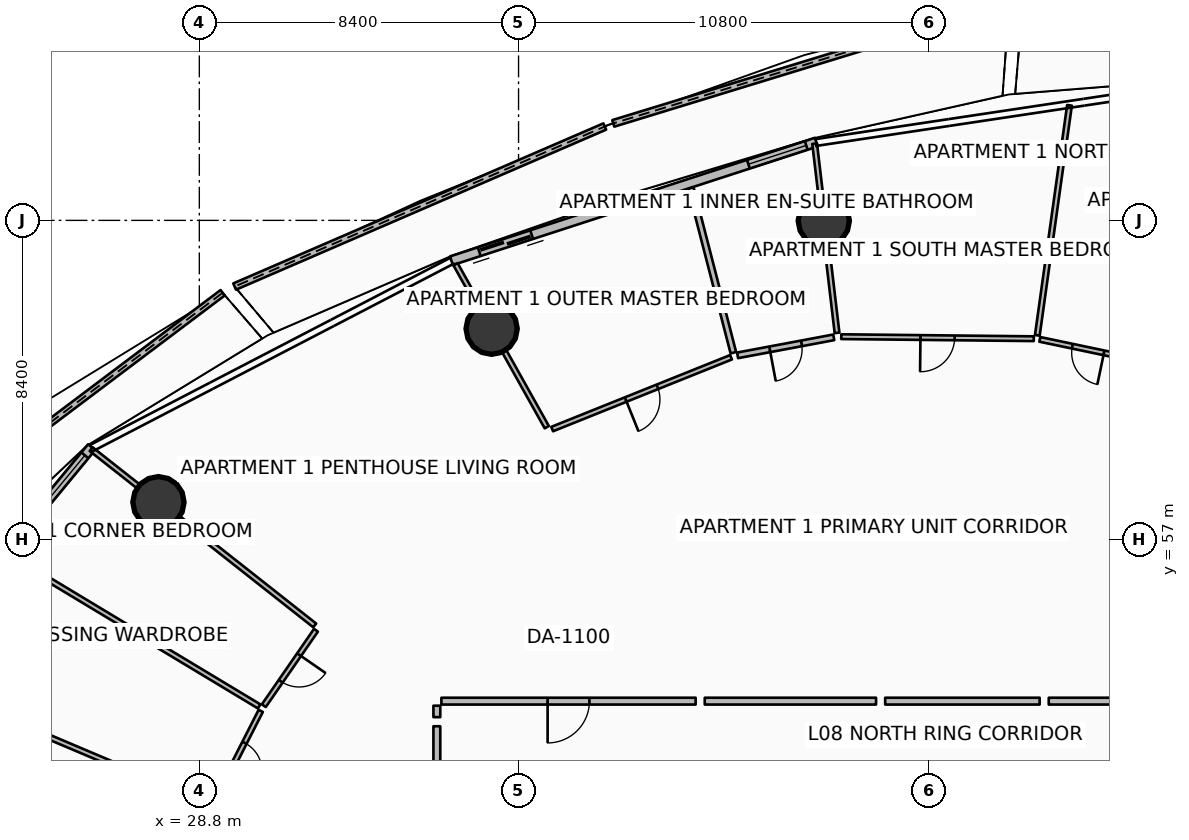
"""IFC4 building model, lengths in metres.
Left out: names, types, materials, properties, quantities, classifications, styles, units other than length and angle.
Written with IfcOpenShell. Run it as: python <this file> out.ifc"""

import sys

from ifc_helpers import new_model, si_unit, direction, frame, frame_2d, origin, origin_2d, place, context, subcontext, project, spatial, polyline, rectangle, circle, outline, extrude, element, fill, save


model = new_model("IFC4")
c1 = context("Model", 3, precision=1e-05, world=origin(), true_north=direction((0.0, 1.0)))
c2 = subcontext(c1, "Body", "Model", "MODEL_VIEW")
j1 = project(units=[si_unit("LENGTHUNIT", "METRE"), si_unit("PLANEANGLEUNIT", "RADIAN")], contexts=[c1])
p1 = place(None, origin())
s1 = spatial("IfcSite", under=j1, at=p1, CompositionType="ELEMENT")
p2 = place(p1, origin())
s2 = spatial("IfcBuilding", under=s1, at=p2, CompositionType="ELEMENT")
p3 = place(p2, frame((0.0, 0.0, 37.65)))
s3 = spatial("IfcBuildingStorey", under=s2, at=p3, CompositionType="ELEMENT", Elevation=37.65)
for number, where, z_axis, x_axis in (
    (1, (45.232, 65.389, 0.0), (0.0, 0.0, 1.0), (1.0, 0.0, 0.0)),
    (2, (36.492, 62.55, 0.0), (0.0, 0.0, 1.0), (1.0, 0.0, 0.0)),
    (3, (27.724, 57.984, 0.0), (0.0, 0.0, 1.0), (1.0, 0.0, 0.0)),
):
    element("IfcColumn", number, at=place(p3, frame(where, z_axis=z_axis, x_axis=x_axis)), inside=s3, PredefinedType="COLUMN", context=c2, shape_type="SweptSolid", body=[
        extrude(circle(Radius=0.675, at=origin_2d()), origin(), (0.0, 0.0, 1.0), 3.5),
    ])
p4 = place(p3, frame((50.114, 71.14, 0.0), z_axis=(0.0, 0.0, 1.0), x_axis=(-0.956262130287, -0.292511090695, 0.0)))
e4 = element("IfcWall", 4, at=p4, inside=s3, PredefinedType="PARAPET", context=c2, shape_type="SweptSolid", body=[
    extrude(outline(polyline([(0.0, 0.0), (10.897, 0.0), (10.897, 1.348), (5.448, 1.562), (0.0, 1.747), (0.0, 0.0)])), frame((0.0, 0.09, 0.0), z_axis=(0.0, -1.0, 0.0), x_axis=(1.0, 0.0, 0.0)), (0.0, 0.0, 1.0), 0.18),
])
p5 = place(p3, frame((39.469, 67.87, 0.0), z_axis=(0.0, 0.0, 1.0), x_axis=(-0.91788240727, -0.396852474384, 0.0)))
e5 = element("IfcWall", 5, at=p5, inside=s3, PredefinedType="PARAPET", context=c2, shape_type="SweptSolid", body=[
    extrude(outline(polyline([(0.0, 0.0), (10.611, 0.0), (10.611, 1.12), (5.305, 1.182), (0.0, 1.348), (0.0, 0.0)])), frame((0.0, 0.09, 0.0), z_axis=(0.0, -1.0, 0.0), x_axis=(1.0, 0.0, 0.0)), (0.0, 0.0, 1.0), 0.18),
])
p6 = place(p3, frame((29.413, 63.495, 0.0), z_axis=(0.0, 0.0, 1.0), x_axis=(-0.798916487869, -0.601441971773, 0.0)))
e6 = element("IfcWall", 6, at=p6, inside=s3, PredefinedType="PARAPET", context=c2, shape_type="SweptSolid", body=[
    extrude(outline(polyline([(0.0, 0.0), (11.803, 0.0), (11.803, 1.348), (5.902, 1.182), (0.0, 1.12), (0.0, 0.0)])), frame((0.0, 0.09, 0.0), z_axis=(0.0, -1.0, 0.0), x_axis=(1.0, 0.0, 0.0)), (0.0, 0.0, 1.0), 0.18),
])
p7 = place(p3, frame((45.036, 67.458, 0.0), z_axis=(0.0, 0.0, 1.0), x_axis=(-0.951054679225, -0.309022648238, 0.0)))
e7 = element("IfcWall", 7, at=p7, inside=s3, PredefinedType="SOLIDWALL", context=c2, shape_type="SweptSolid", body=[
    extrude(rectangle(XDim=10.097, YDim=0.24, at=frame_2d((5.048, 0.0))), origin(), (0.0, 0.0, 1.0), 2.45),
])
p8 = place(p7, frame((7.877, 0.0, 0.0)))
e8 = element("IfcOpeningElement", 8, at=p8, cuts=e7, PredefinedType="OPENING", context=c2, shape_type="SweptSolid", body=[
    extrude(rectangle(XDim=1.45, YDim=2.15, at=frame_2d((0.725, 1.075))), frame((0.0, 0.13, 0.0), z_axis=(0.0, -1.0, 0.0), x_axis=(1.0, 0.0, 0.0)), (0.0, 0.0, 1.0), 0.26),
])
p9 = place(p7, frame((0.28, 0.0, 0.65)))
e9 = element("IfcOpeningElement", 9, at=p9, cuts=e7, PredefinedType="OPENING", context=c2, shape_type="SweptSolid", body=[
    extrude(rectangle(XDim=1.6, YDim=1.5, at=frame_2d((0.8, 0.75))), frame((0.0, 0.13, 0.0), z_axis=(0.0, -1.0, 0.0), x_axis=(1.0, 0.0, 0.0)), (0.0, 0.0, 1.0), 0.26),
])
p10 = place(p3, frame((25.967, 59.433, 0.0), z_axis=(0.0, 0.0, 1.0), x_axis=(-0.636674332663, -0.771132799281, 0.0)))
e10 = element("IfcWall", 10, at=p10, inside=s3, PredefinedType="SOLIDWALL", context=c2, shape_type="SweptSolid", body=[
    extrude(rectangle(XDim=11.851, YDim=0.24, at=frame_2d((5.926, 0.0))), origin(), (0.0, 0.0, 1.0), 2.45),
])
p11 = place(p10, frame((9.631, 0.0, 0.0)))
e11 = element("IfcOpeningElement", 11, at=p11, cuts=e10, PredefinedType="OPENING", context=c2, shape_type="SweptSolid", body=[
    extrude(rectangle(XDim=1.45, YDim=2.15, at=frame_2d((0.725, 1.075))), frame((0.0, 0.13, 0.0), z_axis=(0.0, -1.0, 0.0), x_axis=(1.0, 0.0, 0.0)), (0.0, 0.0, 1.0), 0.26),
])
p12 = place(p10, frame((0.28, 0.0, 0.65)))
e12 = element("IfcOpeningElement", 12, at=p12, cuts=e10, PredefinedType="OPENING", context=c2, shape_type="SweptSolid", body=[
    extrude(rectangle(XDim=1.6, YDim=1.5, at=frame_2d((0.8, 0.75))), frame((0.0, 0.13, 0.0), z_axis=(0.0, -1.0, 0.0), x_axis=(1.0, 0.0, 0.0)), (0.0, 0.0, 1.0), 0.26),
])
p13 = place(p3, frame((41.86, 52.75, 0.0), z_axis=(0.0, 0.0, 1.0), x_axis=(-1.0, 0.0, 0.0)))
e13 = element("IfcWall", 13, at=p13, inside=s3, PredefinedType="PARTITIONING", context=c2, shape_type="SweptSolid", body=[
    extrude(rectangle(XDim=6.69, YDim=0.18, at=frame_2d((3.345, 0.0))), origin(), (0.0, 0.0, 1.0), 2.867),
])
p14 = place(p13, frame((2.795, 0.0, 0.0)))
e14 = element("IfcOpeningElement", 14, at=p14, cuts=e13, PredefinedType="OPENING", context=c2, shape_type="SweptSolid", body=[
    extrude(rectangle(XDim=1.1, YDim=2.1, at=frame_2d((0.55, 1.05))), frame((0.0, 0.1, 0.0), z_axis=(0.0, -1.0, 0.0), x_axis=(1.0, 0.0, 0.0)), (0.0, 0.0, 1.0), 0.2),
])
p15 = place(p3, frame((35.05, 52.63, 0.0), z_axis=(0.0, 0.0, 1.0), x_axis=(0.0, -1.0, 0.0)))
e15 = element("IfcWall", 15, at=p15, inside=s3, PredefinedType="PARTITIONING", context=c2, shape_type="SweptSolid", body=[
    extrude(rectangle(XDim=0.301, YDim=0.18, at=frame_2d((0.15, 0.0))), origin(), (0.0, 0.0, 1.0), 2.867),
])
p16 = place(p3, frame((56.354, 52.75, 0.0), z_axis=(0.0, 0.0, 1.0), x_axis=(-1.0, 0.0, 0.0)))
e16 = element("IfcWall", 16, at=p16, inside=s3, PredefinedType="PARTITIONING", context=c2, shape_type="SweptSolid", body=[
    extrude(rectangle(XDim=5.203, YDim=0.18, at=frame_2d((2.601, 0.0))), origin(), (0.0, 0.0, 1.0), 2.867),
])
p17 = place(p3, frame((50.912, 52.75, 0.0), z_axis=(0.0, 0.0, 1.0), x_axis=(-1.0, 0.0, 0.0)))
e17 = element("IfcWall", 17, at=p17, inside=s3, PredefinedType="PARTITIONING", context=c2, shape_type="SweptSolid", body=[
    extrude(rectangle(XDim=4.064, YDim=0.18, at=frame_2d((2.032, 0.0))), origin(), (0.0, 0.0, 1.0), 2.867),
])
p18 = place(p3, frame((50.851, 62.375, 0.0), z_axis=(0.0, 0.0, 1.0), x_axis=(0.138574188501, 0.990352055726, 0.0)))
e18 = element("IfcWall", 18, at=p18, inside=s3, PredefinedType="PARTITIONING", context=c2, shape_type="SweptSolid", body=[
    extrude(rectangle(XDim=6.112, YDim=0.125, at=frame_2d((3.056, 0.0))), origin(), (0.0, 0.0, 1.0), 2.94),
])
p19 = place(p3, frame((53.462, 61.735, 0.0), z_axis=(0.0, 0.0, 1.0), x_axis=(-0.978662180334, 0.205475878837, 0.0)))
e19 = element("IfcWall", 19, at=p19, inside=s3, PredefinedType="PARTITIONING", context=c2, shape_type="SweptSolid", body=[
    extrude(rectangle(XDim=2.601, YDim=0.125, at=frame_2d((1.3, 0.0))), origin(), (0.0, 0.0, 1.0), 2.867),
])
p20 = place(p19, frame((0.875, 0.0, 0.0)))
e20 = element("IfcOpeningElement", 20, at=p20, cuts=e19, PredefinedType="OPENING", context=c2, shape_type="SweptSolid", body=[
    extrude(rectangle(XDim=0.85, YDim=2.06, at=frame_2d((0.425, 1.03))), frame((0.0, 0.073, 0.0), z_axis=(0.0, -1.0, 0.0), x_axis=(1.0, 0.0, 0.0)), (0.0, 0.0, 1.0), 0.145),
])
p21 = place(p3, frame((50.758, 62.286, 0.0), z_axis=(0.0, 0.0, 1.0), x_axis=(-0.999943799193, 0.010601813775, 0.0)))
e21 = element("IfcWall", 21, at=p21, inside=s3, PredefinedType="PARTITIONING", context=c2, shape_type="SweptSolid", body=[
    extrude(rectangle(XDim=5.066, YDim=0.125, at=frame_2d((2.533, 0.0))), origin(), (0.0, 0.0, 1.0), 2.867),
])
p22 = place(p21, frame((2.083, 0.0, 0.0)))
e22 = element("IfcOpeningElement", 22, at=p22, cuts=e21, PredefinedType="OPENING", context=c2, shape_type="SweptSolid", body=[
    extrude(rectangle(XDim=0.9, YDim=2.08, at=frame_2d((0.45, 1.04))), frame((0.0, 0.073, 0.0), z_axis=(0.0, -1.0, 0.0), x_axis=(1.0, 0.0, 0.0)), (0.0, 0.0, 1.0), 0.145),
])
p23 = place(p3, frame((46.608, 52.75, 0.0), z_axis=(0.0, 0.0, 1.0), x_axis=(-1.0, 0.0, 0.0)))
e23 = element("IfcWall", 23, at=p23, inside=s3, PredefinedType="PARTITIONING", context=c2, shape_type="SweptSolid", body=[
    extrude(rectangle(XDim=4.508, YDim=0.18, at=frame_2d((2.254, 0.0))), origin(), (0.0, 0.0, 1.0), 2.867),
])
p24 = place(p3, frame((45.581, 62.44, 0.0), z_axis=(0.0, 0.0, 1.0), x_axis=(-0.117522242016, 0.993070250602, 0.0)))
e24 = element("IfcWall", 24, at=p24, inside=s3, PredefinedType="PARTITIONING", context=c2, shape_type="SweptSolid", body=[
    extrude(rectangle(XDim=5.013, YDim=0.125, at=frame_2d((2.506, 0.0))), origin(), (0.0, 0.0, 1.0), 2.867),
])
p25 = place(p3, frame((37.943, 59.958, 0.0), z_axis=(0.0, 0.0, 1.0), x_axis=(-0.488606395453, 0.872504321091, 0.0)))
e25 = element("IfcWall", 25, at=p25, inside=s3, PredefinedType="PARTITIONING", context=c2, shape_type="SweptSolid", body=[
    extrude(rectangle(XDim=4.913, YDim=0.125, at=frame_2d((2.457, 0.0))), origin(), (0.0, 0.0, 1.0), 2.867),
])
p26 = place(p3, frame((45.494, 62.323, 0.0), z_axis=(0.0, 0.0, 1.0), x_axis=(-0.982882919375, -0.184231286161, 0.0)))
e26 = element("IfcWall", 26, at=p26, inside=s3, PredefinedType="PARTITIONING", context=c2, shape_type="SweptSolid", body=[
    extrude(rectangle(XDim=2.575, YDim=0.15, at=frame_2d((1.288, 0.0))), origin(), (0.0, 0.0, 1.0), 2.867),
])
p27 = place(p26, frame((0.862, 0.0, 0.0)))
e27 = element("IfcOpeningElement", 27, at=p27, cuts=e26, PredefinedType="OPENING", context=c2, shape_type="SweptSolid", body=[
    extrude(rectangle(XDim=0.85, YDim=2.06, at=frame_2d((0.425, 1.03))), frame((0.0, 0.085, 0.0), z_axis=(0.0, -1.0, 0.0), x_axis=(1.0, 0.0, 0.0)), (0.0, 0.0, 1.0), 0.17),
])
p28 = place(p3, frame((42.852, 61.919, 0.0), z_axis=(0.0, 0.0, 1.0), x_axis=(-0.250174852853, 0.968200672898, 0.0)))
e28 = element("IfcWall", 28, at=p28, inside=s3, PredefinedType="PARTITIONING", context=c2, shape_type="SweptSolid", body=[
    extrude(rectangle(XDim=4.477, YDim=0.15, at=frame_2d((2.239, 0.0))), origin(), (0.0, 0.0, 1.0), 2.94),
])
p29 = place(p3, frame((42.792, 61.798, 0.0), z_axis=(0.0, 0.0, 1.0), x_axis=(-0.928027868691, -0.372510771566, 0.0)))
e29 = element("IfcWall", 29, at=p29, inside=s3, PredefinedType="PARTITIONING", context=c2, shape_type="SweptSolid", body=[
    extrude(rectangle(XDim=5.072, YDim=0.125, at=frame_2d((2.536, 0.0))), origin(), (0.0, 0.0, 1.0), 2.867),
])
p30 = place(p29, frame((2.086, 0.0, 0.0)))
e30 = element("IfcOpeningElement", 30, at=p30, cuts=e29, PredefinedType="OPENING", context=c2, shape_type="SweptSolid", body=[
    extrude(rectangle(XDim=0.9, YDim=2.08, at=frame_2d((0.45, 1.04))), frame((0.0, 0.073, 0.0), z_axis=(0.0, -1.0, 0.0), x_axis=(1.0, 0.0, 0.0)), (0.0, 0.0, 1.0), 0.145),
])
p31 = place(p3, frame((35.05, 52.089, 0.0), z_axis=(0.0, 0.0, 1.0), x_axis=(0.0, -1.0, 0.0)))
e31 = element("IfcWall", 31, at=p31, inside=s3, PredefinedType="PARTITIONING", context=c2, shape_type="SweptSolid", body=[
    extrude(rectangle(XDim=6.317, YDim=0.18, at=frame_2d((3.158, 0.0))), origin(), (0.0, 0.0, 1.0), 2.867),
])
p32 = place(p3, frame((31.836, 54.743, 0.0), z_axis=(0.0, 0.0, 1.0), x_axis=(-0.785333171854, 0.619073347178, 0.0)))
e32 = element("IfcWall", 32, at=p32, inside=s3, PredefinedType="PARTITIONING", context=c2, shape_type="SweptSolid", body=[
    extrude(rectangle(XDim=7.489, YDim=0.125, at=frame_2d((3.745, 0.0))), origin(), (0.0, 0.0, 1.0), 2.867),
])
p33 = place(p3, frame((30.375, 52.611, 0.0), z_axis=(0.0, 0.0, 1.0), x_axis=(-0.856697740307, 0.515818748936, 0.0)))
e33 = element("IfcWall", 33, at=p33, inside=s3, PredefinedType="PARTITIONING", context=c2, shape_type="SweptSolid", body=[
    extrude(rectangle(XDim=7.704, YDim=0.125, at=frame_2d((3.852, 0.0))), origin(), (0.0, 0.0, 1.0), 2.94),
])
p34 = place(p3, frame((29.055, 50.022, 0.0), z_axis=(0.0, 0.0, 1.0), x_axis=(-0.920841617163, 0.389936810395, 0.0)))
e34 = element("IfcWall", 34, at=p34, inside=s3, PredefinedType="PARTITIONING", context=c2, shape_type="SweptSolid", body=[
    extrude(rectangle(XDim=8.613, YDim=0.125, at=frame_2d((4.306, 0.0))), origin(), (0.0, 0.0, 1.0), 2.94),
])
p35 = place(p3, frame((31.869, 54.615, 0.0), z_axis=(0.0, 0.0, 1.0), x_axis=(-0.568588801709, -0.822621890404, 0.0)))
e35 = element("IfcWall", 35, at=p35, inside=s3, PredefinedType="PARTITIONING", context=c2, shape_type="SweptSolid", body=[
    extrude(rectangle(XDim=2.412, YDim=0.125, at=frame_2d((1.206, 0.0))), origin(), (0.0, 0.0, 1.0), 2.867),
])
p36 = place(p35, frame((0.781, 0.0, 0.0)))
e36 = element("IfcOpeningElement", 36, at=p36, cuts=e35, PredefinedType="OPENING", context=c2, shape_type="SweptSolid", body=[
    extrude(rectangle(XDim=0.85, YDim=2.06, at=frame_2d((0.425, 1.03))), frame((0.0, 0.073, 0.0), z_axis=(0.0, -1.0, 0.0), x_axis=(1.0, 0.0, 0.0)), (0.0, 0.0, 1.0), 0.145),
])
p37 = place(p3, frame((30.416, 52.493, 0.0), z_axis=(0.0, 0.0, 1.0), x_axis=(-0.454024795493, -0.890989048798, 0.0)))
e37 = element("IfcWall", 37, at=p37, inside=s3, PredefinedType="PARTITIONING", context=c2, shape_type="SweptSolid", body=[
    extrude(rectangle(XDim=2.733, YDim=0.125, at=frame_2d((1.367, 0.0))), origin(), (0.0, 0.0, 1.0), 2.94),
])
p38 = place(p37, frame((0.942, 0.0, 0.0)))
e38 = element("IfcOpeningElement", 38, at=p38, cuts=e37, PredefinedType="OPENING", context=c2, shape_type="SweptSolid", body=[
    extrude(rectangle(XDim=0.85, YDim=2.06, at=frame_2d((0.425, 1.03))), frame((0.0, 0.073, 0.0), z_axis=(0.0, -1.0, 0.0), x_axis=(1.0, 0.0, 0.0)), (0.0, 0.0, 1.0), 0.145),
])
p39 = place(p8, origin())
e39 = element("IfcDoor", 39, at=p39, inside=s3, OperationType="DOUBLE_DOOR_SLIDING", PredefinedType="DOOR", context=c2, shape_type="SweptSolid", body=[
    extrude(rectangle(XDim=1.45, YDim=2.15, at=frame_2d((0.725, 1.075))), frame((0.0, 0.025, 0.0), z_axis=(0.0, -1.0, 0.0), x_axis=(1.0, 0.0, 0.0)), (0.0, 0.0, 1.0), 0.05),
])
fill(e8, e39)
p40 = place(p9, origin())
e40 = element("IfcWindow", 40, at=p40, inside=s3, PartitioningType="SINGLE_PANEL", PredefinedType="WINDOW", context=c2, shape_type="SweptSolid", body=[
    extrude(rectangle(XDim=1.6, YDim=1.5, at=frame_2d((0.8, 0.75))), frame((0.0, 0.03, 0.0), z_axis=(0.0, -1.0, 0.0), x_axis=(1.0, 0.0, 0.0)), (0.0, 0.0, 1.0), 0.06),
])
fill(e9, e40)
p41 = place(p12, origin())
e41 = element("IfcWindow", 41, at=p41, inside=s3, PartitioningType="SINGLE_PANEL", PredefinedType="WINDOW", context=c2, shape_type="SweptSolid", body=[
    extrude(rectangle(XDim=1.6, YDim=1.5, at=frame_2d((0.8, 0.75))), frame((0.0, 0.03, 0.0), z_axis=(0.0, -1.0, 0.0), x_axis=(1.0, 0.0, 0.0)), (0.0, 0.0, 1.0), 0.06),
])
fill(e12, e41)
p42 = place(p14, origin())
e42 = element("IfcDoor", 42, at=p42, inside=s3, OperationType="SINGLE_SWING_RIGHT", PredefinedType="DOOR", context=c2, shape_type="SweptSolid", body=[
    extrude(rectangle(XDim=1.1, YDim=2.1, at=frame_2d((0.55, 1.05))), frame((0.0, 0.025, 0.0), z_axis=(0.0, -1.0, 0.0), x_axis=(1.0, 0.0, 0.0)), (0.0, 0.0, 1.0), 0.05),
])
fill(e14, e42)
p43 = place(p20, origin())
e43 = element("IfcDoor", 43, at=p43, inside=s3, OperationType="SINGLE_SWING_LEFT", PredefinedType="DOOR", context=c2, shape_type="SweptSolid", body=[
    extrude(rectangle(XDim=0.85, YDim=2.06, at=frame_2d((0.425, 1.03))), frame((0.0, 0.025, 0.0), z_axis=(0.0, -1.0, 0.0), x_axis=(1.0, 0.0, 0.0)), (0.0, 0.0, 1.0), 0.05),
])
fill(e20, e43)
p44 = place(p22, origin())
e44 = element("IfcDoor", 44, at=p44, inside=s3, OperationType="SINGLE_SWING_RIGHT", PredefinedType="DOOR", context=c2, shape_type="SweptSolid", body=[
    extrude(rectangle(XDim=0.9, YDim=2.08, at=frame_2d((0.45, 1.04))), frame((0.0, 0.025, 0.0), z_axis=(0.0, -1.0, 0.0), x_axis=(1.0, 0.0, 0.0)), (0.0, 0.0, 1.0), 0.05),
])
fill(e22, e44)
p45 = place(p27, origin())
e45 = element("IfcDoor", 45, at=p45, inside=s3, OperationType="SINGLE_SWING_RIGHT", PredefinedType="DOOR", context=c2, shape_type="SweptSolid", body=[
    extrude(rectangle(XDim=0.85, YDim=2.06, at=frame_2d((0.425, 1.03))), frame((0.0, 0.025, 0.0), z_axis=(0.0, -1.0, 0.0), x_axis=(1.0, 0.0, 0.0)), (0.0, 0.0, 1.0), 0.05),
])
fill(e27, e45)
p46 = place(p30, origin())
e46 = element("IfcDoor", 46, at=p46, inside=s3, OperationType="SINGLE_SWING_RIGHT", PredefinedType="DOOR", context=c2, shape_type="SweptSolid", body=[
    extrude(rectangle(XDim=0.9, YDim=2.08, at=frame_2d((0.45, 1.04))), frame((0.0, 0.025, 0.0), z_axis=(0.0, -1.0, 0.0), x_axis=(1.0, 0.0, 0.0)), (0.0, 0.0, 1.0), 0.05),
])
fill(e30, e46)
p47 = place(p36, origin())
e47 = element("IfcDoor", 47, at=p47, inside=s3, OperationType="SINGLE_SWING_LEFT", PredefinedType="DOOR", context=c2, shape_type="SweptSolid", body=[
    extrude(rectangle(XDim=0.85, YDim=2.06, at=frame_2d((0.425, 1.03))), frame((0.0, 0.025, 0.0), z_axis=(0.0, -1.0, 0.0), x_axis=(1.0, 0.0, 0.0)), (0.0, 0.0, 1.0), 0.05),
])
fill(e36, e47)
p48 = place(p38, origin())
e48 = element("IfcDoor", 48, at=p48, inside=s3, OperationType="SINGLE_SWING_RIGHT", PredefinedType="DOOR", context=c2, shape_type="SweptSolid", body=[
    extrude(rectangle(XDim=0.85, YDim=2.06, at=frame_2d((0.425, 1.03))), frame((0.0, 0.025, 0.0), z_axis=(0.0, -1.0, 0.0), x_axis=(1.0, 0.0, 0.0)), (0.0, 0.0, 1.0), 0.05),
])
fill(e38, e48)
save(model, sys.argv[1])
